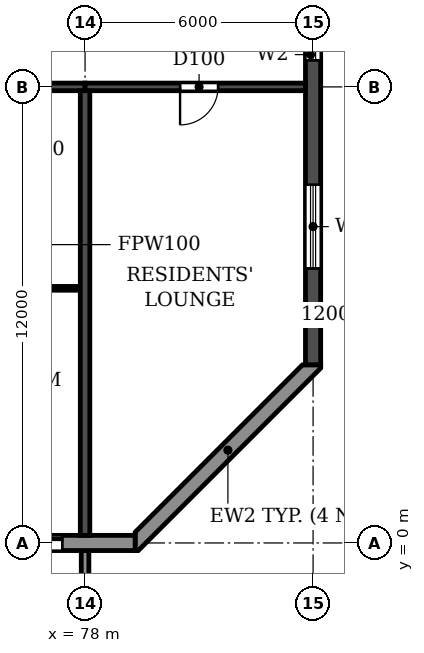
"""IFC4 building model, lengths in metres.
Left out: names, types, materials, properties, quantities, classifications, styles, units other than length and angle.
Written with IfcOpenShell. Run it as: python <this file> out.ifc"""

import sys

from ifc_helpers import new_model, si_unit, direction, frame, frame_2d, origin, place, context, subcontext, project, spatial, polyline, rectangle, outline, extrude, source, transform, mapped, element, fill, save


model = new_model("IFC4")
c1 = context("Model", 3, precision=1e-05, world=origin(), true_north=direction((0.0, 1.0)))
c2 = subcontext(c1, "Body", "Model", "MODEL_VIEW")
j1 = project(units=[si_unit("LENGTHUNIT", "METRE"), si_unit("PLANEANGLEUNIT", "RADIAN")], contexts=[c1])
p1 = place(None, origin())
s1 = spatial("IfcSite", under=j1, at=p1, CompositionType="ELEMENT")
p2 = place(p1, origin())
s2 = spatial("IfcBuilding", under=s1, at=p2, CompositionType="ELEMENT")
p3 = place(p2, frame((0.0, 0.0, 201.6)))
s3 = spatial("IfcBuildingStorey", under=s2, at=p3, CompositionType="ELEMENT", Elevation=201.6)
p4 = place(p3, frame((78.0, 0.2, 0.0), z_axis=(0.0, 0.0, 1.0), x_axis=(0.0, 1.0, 0.0)))
e1 = element("IfcWall", 1, at=p4, inside=s3, PredefinedType="SHEAR", context=c2, shape_type="SweptSolid", body=[
    extrude(rectangle(XDim=11.7, YDim=0.25, at=frame_2d((5.85, 0.0))), origin(), (0.0, 0.0, 1.0), 3.08),
])
p5 = place(p3, frame((84.0, 4.683, 0.0), z_axis=(0.0, 0.0, 1.0), x_axis=(0.0, 1.0, 0.0)))
e2 = element("IfcWall", 2, at=p5, inside=s3, PredefinedType="SHEAR", context=c2, shape_type="SweptSolid", body=[
    extrude(rectangle(XDim=31.834, YDim=0.4, at=frame_2d((15.917, 0.0))), origin(), (0.0, 0.0, 1.0), 3.08),
])
p6 = place(p5, frame((23.817, 0.0, 0.9)))
e3 = element("IfcOpeningElement", 3, at=p6, cuts=e2, PredefinedType="OPENING", context=c2, shape_type="SweptSolid", body=[
    extrude(rectangle(XDim=1.2, YDim=1.5, at=frame_2d((0.6, 0.75))), frame((0.0, 0.21, 0.0), z_axis=(0.0, -1.0, 0.0), x_axis=(1.0, 0.0, 0.0)), (0.0, 0.0, 1.0), 0.42),
])
p7 = place(p5, frame((8.017, 0.0, 0.9)))
e4 = element("IfcOpeningElement", 4, at=p7, cuts=e2, PredefinedType="OPENING", context=c2, shape_type="SweptSolid", body=[
    extrude(rectangle(XDim=1.2, YDim=1.5, at=frame_2d((0.6, 0.75))), frame((0.0, 0.21, 0.0), z_axis=(0.0, -1.0, 0.0), x_axis=(1.0, 0.0, 0.0)), (0.0, 0.0, 1.0), 0.42),
])
p8 = place(p5, frame((27.694, 0.0, 0.6)))
e5 = element("IfcOpeningElement", 5, at=p8, cuts=e2, PredefinedType="OPENING", context=c2, shape_type="SweptSolid", body=[
    extrude(rectangle(XDim=2.2, YDim=1.8, at=frame_2d((1.1, 0.9))), frame((0.0, 0.21, 0.0), z_axis=(0.0, -1.0, 0.0), x_axis=(1.0, 0.0, 0.0)), (0.0, 0.0, 1.0), 0.42),
])
p9 = place(p5, frame((2.541, 0.0, 0.6)))
e6 = element("IfcOpeningElement", 6, at=p9, cuts=e2, PredefinedType="OPENING", context=c2, shape_type="SweptSolid", body=[
    extrude(rectangle(XDim=2.2, YDim=1.8, at=frame_2d((1.1, 0.9))), frame((0.0, 0.21, 0.0), z_axis=(0.0, -1.0, 0.0), x_axis=(1.0, 0.0, 0.0)), (0.0, 0.0, 1.0), 0.42),
])
p10 = place(p5, frame((15.917, 0.0, 0.9)))
e7 = element("IfcOpeningElement", 7, at=p10, cuts=e2, PredefinedType="OPENING", context=c2, shape_type="SweptSolid", body=[
    extrude(rectangle(XDim=1.2, YDim=1.5, at=frame_2d((0.6, 0.75))), frame((0.0, 0.21, 0.0), z_axis=(0.0, -1.0, 0.0), x_axis=(1.0, 0.0, 0.0)), (0.0, 0.0, 1.0), 0.42),
])
p11 = place(p3, frame((72.0, 12.0, 0.0), z_axis=(0.0, 0.0, 1.0), x_axis=(1.0, 0.0, 0.0)))
e8 = element("IfcWall", 8, at=p11, inside=s3, PredefinedType="SHEAR", context=c2, shape_type="SweptSolid", body=[
    extrude(rectangle(XDim=6.0, YDim=0.2, at=frame_2d((3.0, 0.0))), origin(), (0.0, 0.0, 1.0), 2.48),
])
p12 = place(p11, frame((2.55, 0.0, 0.0)))
e9 = element("IfcOpeningElement", 9, at=p12, cuts=e8, PredefinedType="OPENING", context=c2, shape_type="SweptSolid", body=[
    extrude(rectangle(XDim=1.0, YDim=2.1, at=frame_2d((0.5, 1.05))), frame((0.0, 0.11, 0.0), z_axis=(0.0, -1.0, 0.0), x_axis=(1.0, 0.0, 0.0)), (0.0, 0.0, 1.0), 0.22),
])
p13 = place(p3, frame((78.0, 12.0, 0.0), z_axis=(0.0, 0.0, 1.0), x_axis=(1.0, 0.0, 0.0)))
e10 = element("IfcWall", 10, at=p13, inside=s3, PredefinedType="SHEAR", context=c2, shape_type="SweptSolid", body=[
    extrude(rectangle(XDim=5.8, YDim=0.2, at=frame_2d((2.9, 0.0))), origin(), (0.0, 0.0, 1.0), 2.48),
])
p14 = place(p13, frame((2.5, 0.0, 0.0)))
e11 = element("IfcOpeningElement", 11, at=p14, cuts=e10, PredefinedType="OPENING", context=c2, shape_type="SweptSolid", body=[
    extrude(rectangle(XDim=1.0, YDim=2.1, at=frame_2d((0.5, 1.05))), frame((0.0, 0.11, 0.0), z_axis=(0.0, -1.0, 0.0), x_axis=(1.0, 0.0, 0.0)), (0.0, 0.0, 1.0), 0.22),
])
p15 = place(p3, frame((22.683, 0.0, 0.0), z_axis=(0.0, 0.0, 1.0), x_axis=(1.0, 0.0, 0.0)))
e12 = element("IfcWall", 12, at=p15, inside=s3, PredefinedType="STANDARD", context=c2, shape_type="SweptSolid", body=[
    extrude(rectangle(XDim=56.634, YDim=0.4, at=frame_2d((28.317, 0.0))), origin(), (0.0, 0.0, 1.0), 3.08),
])
p16 = place(p15, frame((1.917, 0.0, 0.0)))
e13 = element("IfcOpeningElement", 13, at=p16, cuts=e12, PredefinedType="OPENING", context=c2, shape_type="SweptSolid", body=[
    extrude(rectangle(XDim=1.8, YDim=2.4, at=frame_2d((0.9, 1.2))), frame((0.0, 0.21, 0.0), z_axis=(0.0, -1.0, 0.0), x_axis=(1.0, 0.0, 0.0)), (0.0, 0.0, 1.0), 0.42),
])
p17 = place(p15, frame((4.717, 0.0, 0.9)))
e14 = element("IfcOpeningElement", 14, at=p17, cuts=e12, PredefinedType="OPENING", context=c2, shape_type="SweptSolid", body=[
    extrude(rectangle(XDim=2.2, YDim=1.5, at=frame_2d((1.1, 0.75))), frame((0.0, 0.21, 0.0), z_axis=(0.0, -1.0, 0.0), x_axis=(1.0, 0.0, 0.0)), (0.0, 0.0, 1.0), 0.42),
])
p18 = place(p15, frame((7.717, 0.0, 0.9)))
e15 = element("IfcOpeningElement", 15, at=p18, cuts=e12, PredefinedType="OPENING", context=c2, shape_type="SweptSolid", body=[
    extrude(rectangle(XDim=2.2, YDim=1.5, at=frame_2d((1.1, 0.75))), frame((0.0, 0.21, 0.0), z_axis=(0.0, -1.0, 0.0), x_axis=(1.0, 0.0, 0.0)), (0.0, 0.0, 1.0), 0.42),
])
p19 = place(p15, frame((10.717, 0.0, 0.9)))
e16 = element("IfcOpeningElement", 16, at=p19, cuts=e12, PredefinedType="OPENING", context=c2, shape_type="SweptSolid", body=[
    extrude(rectangle(XDim=2.2, YDim=1.5, at=frame_2d((1.1, 0.75))), frame((0.0, 0.21, 0.0), z_axis=(0.0, -1.0, 0.0), x_axis=(1.0, 0.0, 0.0)), (0.0, 0.0, 1.0), 0.42),
])
p20 = place(p15, frame((13.917, 0.0, 0.0)))
e17 = element("IfcOpeningElement", 17, at=p20, cuts=e12, PredefinedType="OPENING", context=c2, shape_type="SweptSolid", body=[
    extrude(rectangle(XDim=1.8, YDim=2.4, at=frame_2d((0.9, 1.2))), frame((0.0, 0.21, 0.0), z_axis=(0.0, -1.0, 0.0), x_axis=(1.0, 0.0, 0.0)), (0.0, 0.0, 1.0), 0.42),
])
p21 = place(p15, frame((16.717, 0.0, 0.9)))
e18 = element("IfcOpeningElement", 18, at=p21, cuts=e12, PredefinedType="OPENING", context=c2, shape_type="SweptSolid", body=[
    extrude(rectangle(XDim=2.2, YDim=1.5, at=frame_2d((1.1, 0.75))), frame((0.0, 0.21, 0.0), z_axis=(0.0, -1.0, 0.0), x_axis=(1.0, 0.0, 0.0)), (0.0, 0.0, 1.0), 0.42),
])
p22 = place(p15, frame((19.717, 0.0, 0.9)))
e19 = element("IfcOpeningElement", 19, at=p22, cuts=e12, PredefinedType="OPENING", context=c2, shape_type="SweptSolid", body=[
    extrude(rectangle(XDim=2.2, YDim=1.5, at=frame_2d((1.1, 0.75))), frame((0.0, 0.21, 0.0), z_axis=(0.0, -1.0, 0.0), x_axis=(1.0, 0.0, 0.0)), (0.0, 0.0, 1.0), 0.42),
])
p23 = place(p15, frame((22.717, 0.0, 0.9)))
e20 = element("IfcOpeningElement", 20, at=p23, cuts=e12, PredefinedType="OPENING", context=c2, shape_type="SweptSolid", body=[
    extrude(rectangle(XDim=2.2, YDim=1.5, at=frame_2d((1.1, 0.75))), frame((0.0, 0.21, 0.0), z_axis=(0.0, -1.0, 0.0), x_axis=(1.0, 0.0, 0.0)), (0.0, 0.0, 1.0), 0.42),
])
p24 = place(p15, frame((25.917, 0.0, 0.0)))
e21 = element("IfcOpeningElement", 21, at=p24, cuts=e12, PredefinedType="OPENING", context=c2, shape_type="SweptSolid", body=[
    extrude(rectangle(XDim=1.8, YDim=2.4, at=frame_2d((0.9, 1.2))), frame((0.0, 0.21, 0.0), z_axis=(0.0, -1.0, 0.0), x_axis=(1.0, 0.0, 0.0)), (0.0, 0.0, 1.0), 0.42),
])
p25 = place(p15, frame((28.717, 0.0, 0.9)))
e22 = element("IfcOpeningElement", 22, at=p25, cuts=e12, PredefinedType="OPENING", context=c2, shape_type="SweptSolid", body=[
    extrude(rectangle(XDim=2.2, YDim=1.5, at=frame_2d((1.1, 0.75))), frame((0.0, 0.21, 0.0), z_axis=(0.0, -1.0, 0.0), x_axis=(1.0, 0.0, 0.0)), (0.0, 0.0, 1.0), 0.42),
])
p26 = place(p15, frame((31.717, 0.0, 0.9)))
e23 = element("IfcOpeningElement", 23, at=p26, cuts=e12, PredefinedType="OPENING", context=c2, shape_type="SweptSolid", body=[
    extrude(rectangle(XDim=2.2, YDim=1.5, at=frame_2d((1.1, 0.75))), frame((0.0, 0.21, 0.0), z_axis=(0.0, -1.0, 0.0), x_axis=(1.0, 0.0, 0.0)), (0.0, 0.0, 1.0), 0.42),
])
p27 = place(p15, frame((34.717, 0.0, 0.9)))
e24 = element("IfcOpeningElement", 24, at=p27, cuts=e12, PredefinedType="OPENING", context=c2, shape_type="SweptSolid", body=[
    extrude(rectangle(XDim=2.2, YDim=1.5, at=frame_2d((1.1, 0.75))), frame((0.0, 0.21, 0.0), z_axis=(0.0, -1.0, 0.0), x_axis=(1.0, 0.0, 0.0)), (0.0, 0.0, 1.0), 0.42),
])
p28 = place(p15, frame((37.717, 0.0, 0.9)))
e25 = element("IfcOpeningElement", 25, at=p28, cuts=e12, PredefinedType="OPENING", context=c2, shape_type="SweptSolid", body=[
    extrude(rectangle(XDim=2.2, YDim=1.5, at=frame_2d((1.1, 0.75))), frame((0.0, 0.21, 0.0), z_axis=(0.0, -1.0, 0.0), x_axis=(1.0, 0.0, 0.0)), (0.0, 0.0, 1.0), 0.42),
])
p29 = place(p15, frame((40.717, 0.0, 0.9)))
e26 = element("IfcOpeningElement", 26, at=p29, cuts=e12, PredefinedType="OPENING", context=c2, shape_type="SweptSolid", body=[
    extrude(rectangle(XDim=2.2, YDim=1.5, at=frame_2d((1.1, 0.75))), frame((0.0, 0.21, 0.0), z_axis=(0.0, -1.0, 0.0), x_axis=(1.0, 0.0, 0.0)), (0.0, 0.0, 1.0), 0.42),
])
p30 = place(p15, frame((43.717, 0.0, 0.9)))
e27 = element("IfcOpeningElement", 27, at=p30, cuts=e12, PredefinedType="OPENING", context=c2, shape_type="SweptSolid", body=[
    extrude(rectangle(XDim=2.2, YDim=1.5, at=frame_2d((1.1, 0.75))), frame((0.0, 0.21, 0.0), z_axis=(0.0, -1.0, 0.0), x_axis=(1.0, 0.0, 0.0)), (0.0, 0.0, 1.0), 0.42),
])
p31 = place(p15, frame((46.717, 0.0, 0.9)))
e28 = element("IfcOpeningElement", 28, at=p31, cuts=e12, PredefinedType="OPENING", context=c2, shape_type="SweptSolid", body=[
    extrude(rectangle(XDim=2.2, YDim=1.5, at=frame_2d((1.1, 0.75))), frame((0.0, 0.21, 0.0), z_axis=(0.0, -1.0, 0.0), x_axis=(1.0, 0.0, 0.0)), (0.0, 0.0, 1.0), 0.42),
])
p32 = place(p15, frame((49.717, 0.0, 0.9)))
e29 = element("IfcOpeningElement", 29, at=p32, cuts=e12, PredefinedType="OPENING", context=c2, shape_type="SweptSolid", body=[
    extrude(rectangle(XDim=2.2, YDim=1.5, at=frame_2d((1.1, 0.75))), frame((0.0, 0.21, 0.0), z_axis=(0.0, -1.0, 0.0), x_axis=(1.0, 0.0, 0.0)), (0.0, 0.0, 1.0), 0.42),
])
p33 = place(p15, frame((52.917, 0.0, 0.0)))
e30 = element("IfcOpeningElement", 30, at=p33, cuts=e12, PredefinedType="OPENING", context=c2, shape_type="SweptSolid", body=[
    extrude(rectangle(XDim=1.8, YDim=2.4, at=frame_2d((0.9, 1.2))), frame((0.0, 0.21, 0.0), z_axis=(0.0, -1.0, 0.0), x_axis=(1.0, 0.0, 0.0)), (0.0, 0.0, 1.0), 0.42),
])
p34 = place(p3, origin())
e31 = element("IfcWall", 31, at=p34, inside=s3, PredefinedType="STANDARD", context=c2, shape_type="SweptSolid", body=[
    extrude(outline(polyline([(79.317, -0.2), (79.4, -0.2), (84.2, 4.6), (84.2, 4.683), (83.717, 4.683), (79.317, 0.283), (79.317, -0.2)])), origin(), (0.0, 0.0, 1.0), 3.08),
])
m1 = source(origin(), c2, "Body", "SweptSolid", [
    extrude(outline(polyline([(0.0, 0.0), (0.2, 0.0), (0.2, 1.65), (0.0, 1.65), (0.0, 0.0)])), origin(), (0.0, 0.0, 1.0), 3.1),
])
p35 = place(p3, frame((77.9, -1.85, 0.0)))
e32 = element("IfcWall", 32, at=p35, inside=s3, PredefinedType="STANDARD", context=c2, shape_type="MappedRepresentation", body=[
    mapped(m1, transform((0.0, 0.0, 0.0))),
])
p36 = place(p3, frame((75.9, 6.7, 0.0), z_axis=(0.0, 0.0, 1.0), x_axis=(1.0, 0.0, 0.0)))
e33 = element("IfcWall", 33, at=p36, inside=s3, PredefinedType="PARTITIONING", context=c2, shape_type="SweptSolid", body=[
    extrude(rectangle(XDim=1.965, YDim=0.1, at=frame_2d((0.982, 0.0))), origin(), (0.0, 0.0, 1.0), 3.08),
])
p37 = place(p33, origin())
e34 = element("IfcDoor", 34, at=p37, inside=s3, OperationType="DOUBLE_DOOR_SLIDING", PredefinedType="DOOR", context=c2, shape_type="SweptSolid", body=[
    extrude(rectangle(XDim=1.8, YDim=2.4, at=frame_2d((0.9, 1.2))), frame((0.0, 0.025, 0.0), z_axis=(0.0, -1.0, 0.0), x_axis=(1.0, 0.0, 0.0)), (0.0, 0.0, 1.0), 0.05),
])
fill(e30, e34)
p38 = place(p7, origin())
e35 = element("IfcWindow", 35, at=p38, inside=s3, PartitioningType="SINGLE_PANEL", PredefinedType="WINDOW", context=c2, shape_type="SweptSolid", body=[
    extrude(rectangle(XDim=1.2, YDim=1.5, at=frame_2d((0.6, 0.75))), frame((0.0, 0.03, 0.0), z_axis=(0.0, -1.0, 0.0), x_axis=(1.0, 0.0, 0.0)), (0.0, 0.0, 1.0), 0.06),
])
fill(e4, e35)
p39 = place(p9, origin())
e36 = element("IfcWindow", 36, at=p39, inside=s3, PartitioningType="DOUBLE_PANEL_HORIZONTAL", PredefinedType="WINDOW", context=c2, shape_type="SweptSolid", body=[
    extrude(rectangle(XDim=2.2, YDim=1.8, at=frame_2d((1.1, 0.9))), frame((0.0, 0.03, 0.0), z_axis=(0.0, -1.0, 0.0), x_axis=(1.0, 0.0, 0.0)), (0.0, 0.0, 1.0), 0.06),
])
fill(e6, e36)
p40 = place(p14, frame((1.0, 0.0, 0.0), z_axis=(0.0, 0.0, 1.0), x_axis=(-1.0, 0.0, 0.0)))
e37 = element("IfcDoor", 37, at=p40, inside=s3, OperationType="SINGLE_SWING_RIGHT", PredefinedType="DOOR", context=c2, shape_type="SweptSolid", body=[
    extrude(rectangle(XDim=1.0, YDim=2.1, at=frame_2d((0.5, 1.05))), frame((0.0, 0.025, 0.0), z_axis=(0.0, -1.0, 0.0), x_axis=(1.0, 0.0, 0.0)), (0.0, 0.0, 1.0), 0.05),
])
fill(e11, e37)
save(model, sys.argv[1])
